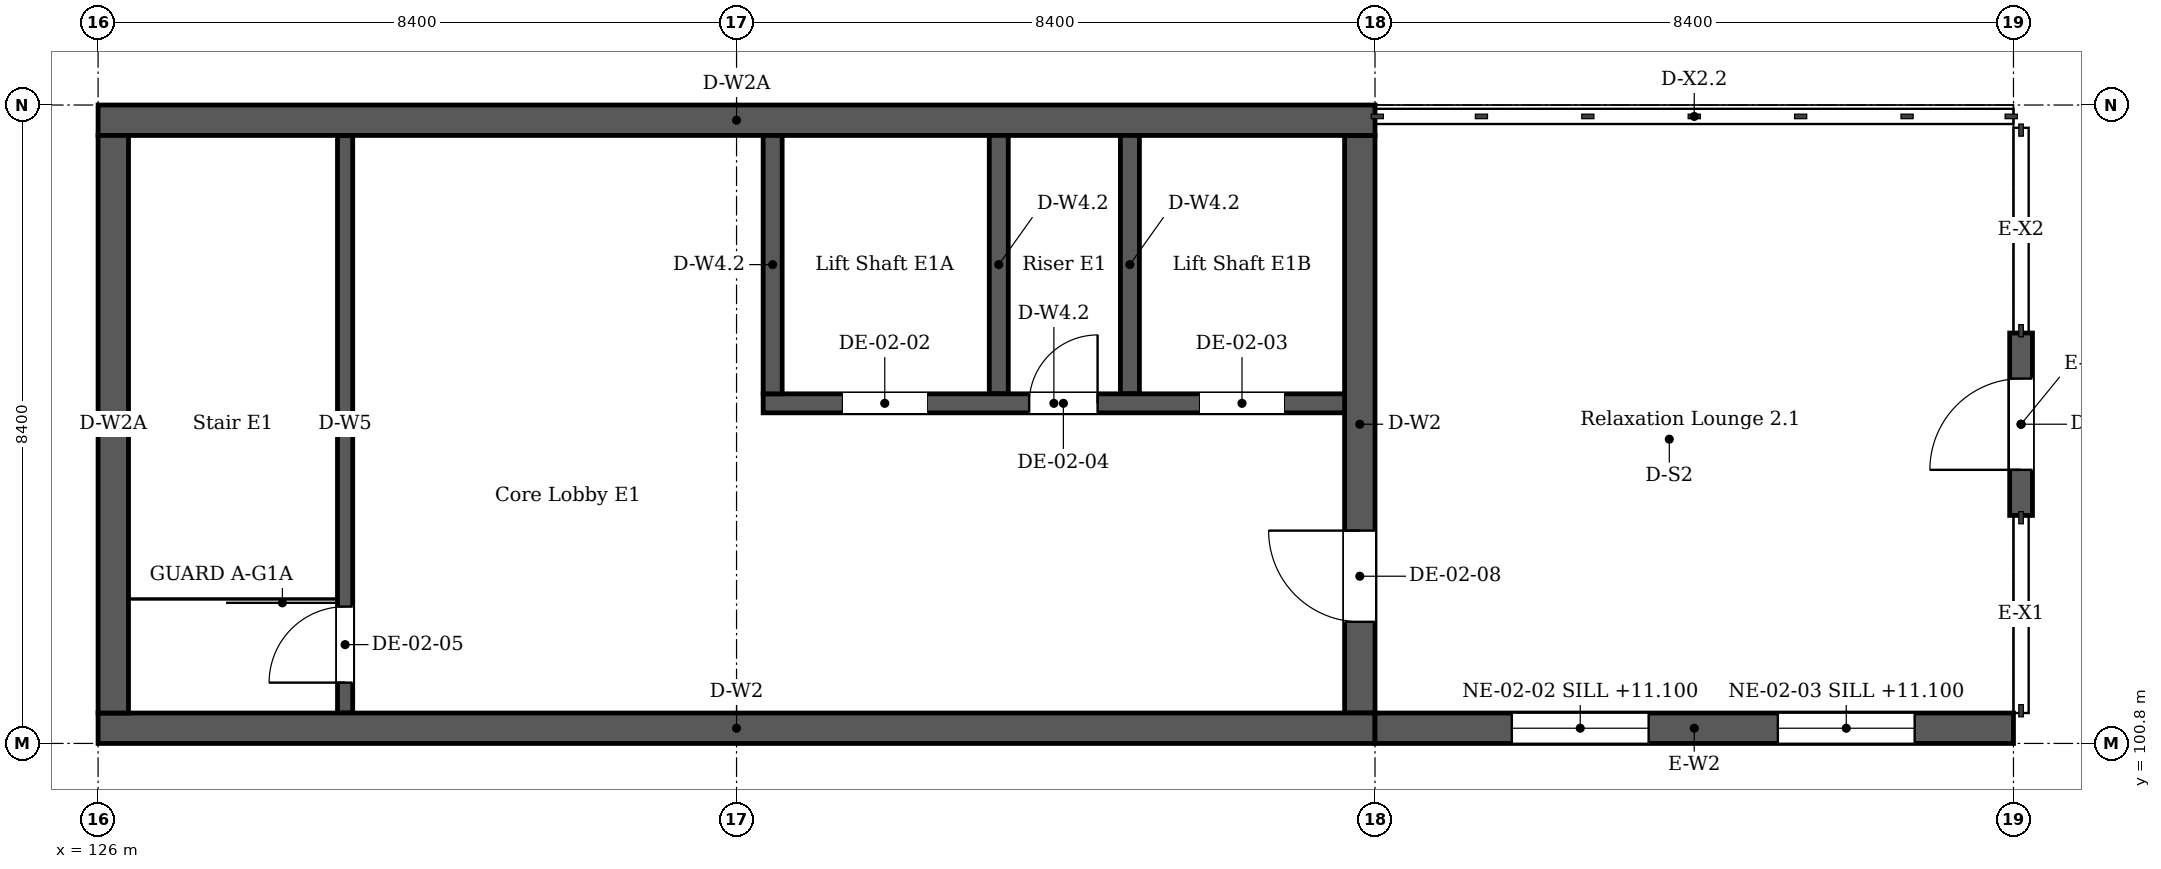
"""IFC4 building model, lengths in metres.
Left out: names, types, materials, properties, quantities, classifications, styles, units other than length and angle.
Written with IfcOpenShell. Run it as: python <this file> out.ifc"""

import sys

from ifc_helpers import new_model, si_unit, direction, frame, frame_2d, origin, place, context, subcontext, project, spatial, rectangle, extrude, element, fill, save


model = new_model("IFC4")
c1 = context("Model", 3, precision=1e-05, world=origin(), true_north=direction((0.0, 1.0)))
c2 = subcontext(c1, "Body", "Model", "MODEL_VIEW")
j1 = project(units=[si_unit("LENGTHUNIT", "METRE"), si_unit("PLANEANGLEUNIT", "RADIAN")], contexts=[c1])
p1 = place(None, origin())
s1 = spatial("IfcSite", under=j1, at=p1, CompositionType="ELEMENT")
p2 = place(p1, origin())
s2 = spatial("IfcBuilding", under=s1, at=p2, CompositionType="ELEMENT")
p3 = place(p2, frame((0.0, 0.0, 10.2)))
s3 = spatial("IfcBuildingStorey", under=s2, at=p3, CompositionType="ELEMENT", Elevation=10.2)
for number, where, z_axis, x_axis in (
    (1, (126.0, 101.0, 0.0), (0.0, 0.0, 1.0), (1.0, 0.0, 0.0)),
    (2, (126.0, 109.0, 0.0), (0.0, 0.0, 1.0), (1.0, 0.0, 0.0)),
):
    element("IfcWall", number, at=place(p3, frame(where, z_axis=z_axis, x_axis=x_axis)), inside=s3, PredefinedType="SOLIDWALL", context=c2, shape_type="SweptSolid", body=[
        extrude(rectangle(XDim=16.8, YDim=0.4, at=frame_2d((8.4, 0.0))), origin(), (0.0, 0.0, 1.0), 3.92),
    ])
p4 = place(p3, frame((126.2, 101.2, 0.0), z_axis=(0.0, 0.0, 1.0), x_axis=(0.0, 1.0, 0.0)))
e3 = element("IfcWall", 3, at=p4, inside=s3, PredefinedType="SOLIDWALL", context=c2, shape_type="SweptSolid", body=[
    extrude(rectangle(XDim=7.6, YDim=0.4, at=frame_2d((3.8, 0.0))), origin(), (0.0, 0.0, 1.0), 3.92),
])
p5 = place(p3, frame((142.6, 101.2, 0.0), z_axis=(0.0, 0.0, 1.0), x_axis=(0.0, 1.0, 0.0)))
e4 = element("IfcWall", 4, at=p5, inside=s3, PredefinedType="SOLIDWALL", context=c2, shape_type="SweptSolid", body=[
    extrude(rectangle(XDim=7.6, YDim=0.4, at=frame_2d((3.8, 0.0))), origin(), (0.0, 0.0, 1.0), 3.92),
])
p6 = place(p5, frame((1.2, 0.0, 0.0)))
e5 = element("IfcOpeningElement", 5, at=p6, cuts=e4, PredefinedType="OPENING", context=c2, shape_type="SweptSolid", body=[
    extrude(rectangle(XDim=1.2, YDim=2.1, at=frame_2d((0.6, 1.05))), frame((0.0, 0.21, 0.0), z_axis=(0.0, -1.0, 0.0), x_axis=(1.0, 0.0, 0.0)), (0.0, 0.0, 1.0), 0.42),
])
p7 = place(p3, frame((129.25, 101.2, 0.0), z_axis=(0.0, 0.0, 1.0), x_axis=(0.0, 1.0, 0.0)))
e6 = element("IfcWall", 6, at=p7, inside=s3, PredefinedType="SOLIDWALL", context=c2, shape_type="SweptSolid", body=[
    extrude(rectangle(XDim=7.6, YDim=0.2, at=frame_2d((3.8, 0.0))), origin(), (0.0, 0.0, 1.0), 3.92),
])
p8 = place(p7, frame((0.4, 0.0, 0.0)))
e7 = element("IfcOpeningElement", 7, at=p8, cuts=e6, PredefinedType="OPENING", context=c2, shape_type="SweptSolid", body=[
    extrude(rectangle(XDim=1.0, YDim=2.1, at=frame_2d((0.5, 1.05))), frame((0.0, 0.11, 0.0), z_axis=(0.0, -1.0, 0.0), x_axis=(1.0, 0.0, 0.0)), (0.0, 0.0, 1.0), 0.22),
])
p9 = place(p3, frame((142.8, 101.0, 0.0), z_axis=(0.0, 0.0, 1.0), x_axis=(1.0, 0.0, 0.0)))
e8 = element("IfcWall", 8, at=p9, inside=s3, PredefinedType="SOLIDWALL", context=c2, shape_type="SweptSolid", body=[
    extrude(rectangle(XDim=8.4, YDim=0.4, at=frame_2d((4.2, 0.0))), origin(), (0.0, 0.0, 1.0), 3.92),
])
p10 = place(p9, frame((1.8, 0.0, 0.9)))
e9 = element("IfcOpeningElement", 9, at=p10, cuts=e8, PredefinedType="OPENING", context=c2, shape_type="SweptSolid", body=[
    extrude(rectangle(XDim=1.8, YDim=1.2, at=frame_2d((0.9, 0.6))), frame((0.0, 0.21, 0.0), z_axis=(0.0, -1.0, 0.0), x_axis=(1.0, 0.0, 0.0)), (0.0, 0.0, 1.0), 0.42),
])
p11 = place(p9, frame((5.3, 0.0, 0.9)))
e10 = element("IfcOpeningElement", 10, at=p11, cuts=e8, PredefinedType="OPENING", context=c2, shape_type="SweptSolid", body=[
    extrude(rectangle(XDim=1.8, YDim=1.2, at=frame_2d((0.9, 0.6))), frame((0.0, 0.21, 0.0), z_axis=(0.0, -1.0, 0.0), x_axis=(1.0, 0.0, 0.0)), (0.0, 0.0, 1.0), 0.42),
])
p12 = place(p3, frame((134.75, 105.275, 0.0), z_axis=(0.0, 0.0, 1.0), x_axis=(1.0, 0.0, 0.0)))
e11 = element("IfcWall", 11, at=p12, inside=s3, PredefinedType="SOLIDWALL", context=c2, shape_type="SweptSolid", body=[
    extrude(rectangle(XDim=7.65, YDim=0.25, at=frame_2d((3.825, 0.0))), origin(), (0.0, 0.0, 1.0), 4.8),
])
p13 = place(p12, frame((1.05, 0.0, 0.0)))
e12 = element("IfcOpeningElement", 12, at=p13, cuts=e11, PredefinedType="OPENING", context=c2, shape_type="SweptSolid", body=[
    extrude(rectangle(XDim=1.1, YDim=2.1, at=frame_2d((0.55, 1.05))), frame((0.0, 0.135, 0.0), z_axis=(0.0, -1.0, 0.0), x_axis=(1.0, 0.0, 0.0)), (0.0, 0.0, 1.0), 0.27),
])
p14 = place(p12, frame((5.75, 0.0, 0.0)))
e13 = element("IfcOpeningElement", 13, at=p14, cuts=e11, PredefinedType="OPENING", context=c2, shape_type="SweptSolid", body=[
    extrude(rectangle(XDim=1.1, YDim=2.1, at=frame_2d((0.55, 1.05))), frame((0.0, 0.135, 0.0), z_axis=(0.0, -1.0, 0.0), x_axis=(1.0, 0.0, 0.0)), (0.0, 0.0, 1.0), 0.27),
])
p15 = place(p12, frame((3.5, 0.0, 0.0)))
e14 = element("IfcOpeningElement", 14, at=p15, cuts=e11, PredefinedType="OPENING", context=c2, shape_type="SweptSolid", body=[
    extrude(rectangle(XDim=0.9, YDim=2.1, at=frame_2d((0.45, 1.05))), frame((0.0, 0.135, 0.0), z_axis=(0.0, -1.0, 0.0), x_axis=(1.0, 0.0, 0.0)), (0.0, 0.0, 1.0), 0.27),
])
for number, where, z_axis, x_axis in (
    (15, (134.875, 105.4, 0.0), (0.0, 0.0, 1.0), (0.0, 1.0, 0.0)),
    (16, (137.85, 105.4, 0.0), (0.0, 0.0, 1.0), (0.0, 1.0, 0.0)),
    (17, (139.575, 105.4, 0.0), (0.0, 0.0, 1.0), (0.0, 1.0, 0.0)),
):
    element("IfcWall", number, at=place(p3, frame(where, z_axis=z_axis, x_axis=x_axis)), inside=s3, PredefinedType="SOLIDWALL", context=c2, shape_type="SweptSolid", body=[
        extrude(rectangle(XDim=3.4, YDim=0.25, at=frame_2d((1.7, 0.0))), origin(), (0.0, 0.0, 1.0), 4.8),
    ])
p16 = place(p3, frame((151.3, 103.8, 0.0), z_axis=(0.0, 0.0, 1.0), x_axis=(0.0, 1.0, 0.0)))
e18 = element("IfcWall", 18, at=p16, inside=s3, PredefinedType="SOLIDWALL", context=c2, shape_type="SweptSolid", body=[
    extrude(rectangle(XDim=2.4, YDim=0.3, at=frame_2d((1.2, 0.0))), origin(), (0.0, 0.0, 1.0), 3.92),
])
p17 = place(p16, frame((0.6, 0.0, 0.0)))
e19 = element("IfcOpeningElement", 19, at=p17, cuts=e18, PredefinedType="OPENING", context=c2, shape_type="SweptSolid", body=[
    extrude(rectangle(XDim=1.2, YDim=2.4, at=frame_2d((0.6, 1.2))), frame((0.0, 0.16, 0.0), z_axis=(0.0, -1.0, 0.0), x_axis=(1.0, 0.0, 0.0)), (0.0, 0.0, 1.0), 0.32),
])
p18 = place(p17, origin())
e20 = element("IfcDoor", 20, at=p18, inside=s3, OperationType="SINGLE_SWING_LEFT", PredefinedType="DOOR", context=c2, shape_type="SweptSolid", body=[
    extrude(rectangle(XDim=1.2, YDim=2.4, at=frame_2d((0.6, 1.2))), frame((0.0, 0.025, 0.0), z_axis=(0.0, -1.0, 0.0), x_axis=(1.0, 0.0, 0.0)), (0.0, 0.0, 1.0), 0.05),
])
fill(e19, e20)
p19 = place(p10, origin())
e21 = element("IfcWindow", 21, at=p19, inside=s3, PartitioningType="SINGLE_PANEL", PredefinedType="WINDOW", context=c2, shape_type="SweptSolid", body=[
    extrude(rectangle(XDim=1.8, YDim=1.2, at=frame_2d((0.9, 0.6))), frame((0.0, 0.03, 0.0), z_axis=(0.0, -1.0, 0.0), x_axis=(1.0, 0.0, 0.0)), (0.0, 0.0, 1.0), 0.06),
])
fill(e9, e21)
p20 = place(p11, origin())
e22 = element("IfcWindow", 22, at=p20, inside=s3, PartitioningType="SINGLE_PANEL", PredefinedType="WINDOW", context=c2, shape_type="SweptSolid", body=[
    extrude(rectangle(XDim=1.8, YDim=1.2, at=frame_2d((0.9, 0.6))), frame((0.0, 0.03, 0.0), z_axis=(0.0, -1.0, 0.0), x_axis=(1.0, 0.0, 0.0)), (0.0, 0.0, 1.0), 0.06),
])
fill(e10, e22)
p21 = place(p13, origin())
e23 = element("IfcDoor", 23, at=p21, inside=s3, OperationType="DOUBLE_DOOR_SLIDING", PredefinedType="DOOR", context=c2, shape_type="SweptSolid", body=[
    extrude(rectangle(XDim=1.1, YDim=2.1, at=frame_2d((0.55, 1.05))), frame((0.0, 0.025, 0.0), z_axis=(0.0, -1.0, 0.0), x_axis=(1.0, 0.0, 0.0)), (0.0, 0.0, 1.0), 0.05),
])
fill(e12, e23)
p22 = place(p14, origin())
e24 = element("IfcDoor", 24, at=p22, inside=s3, OperationType="DOUBLE_DOOR_SLIDING", PredefinedType="DOOR", context=c2, shape_type="SweptSolid", body=[
    extrude(rectangle(XDim=1.1, YDim=2.1, at=frame_2d((0.55, 1.05))), frame((0.0, 0.025, 0.0), z_axis=(0.0, -1.0, 0.0), x_axis=(1.0, 0.0, 0.0)), (0.0, 0.0, 1.0), 0.05),
])
fill(e13, e24)
p23 = place(p15, origin())
e25 = element("IfcDoor", 25, at=p23, inside=s3, OperationType="SINGLE_SWING_LEFT", PredefinedType="DOOR", context=c2, shape_type="SweptSolid", body=[
    extrude(rectangle(XDim=0.9, YDim=2.1, at=frame_2d((0.45, 1.05))), frame((0.0, 0.025, 0.0), z_axis=(0.0, -1.0, 0.0), x_axis=(1.0, 0.0, 0.0)), (0.0, 0.0, 1.0), 0.05),
])
fill(e14, e25)
p24 = place(p8, origin())
e26 = element("IfcDoor", 26, at=p24, inside=s3, OperationType="SINGLE_SWING_LEFT", PredefinedType="DOOR", context=c2, shape_type="SweptSolid", body=[
    extrude(rectangle(XDim=1.0, YDim=2.1, at=frame_2d((0.5, 1.05))), frame((0.0, 0.025, 0.0), z_axis=(0.0, -1.0, 0.0), x_axis=(1.0, 0.0, 0.0)), (0.0, 0.0, 1.0), 0.05),
])
fill(e7, e26)
p25 = place(p6, origin())
e27 = element("IfcDoor", 27, at=p25, inside=s3, OperationType="SINGLE_SWING_LEFT", PredefinedType="DOOR", context=c2, shape_type="SweptSolid", body=[
    extrude(rectangle(XDim=1.2, YDim=2.1, at=frame_2d((0.6, 1.05))), frame((0.0, 0.025, 0.0), z_axis=(0.0, -1.0, 0.0), x_axis=(1.0, 0.0, 0.0)), (0.0, 0.0, 1.0), 0.05),
])
fill(e5, e27)
save(model, sys.argv[1])
